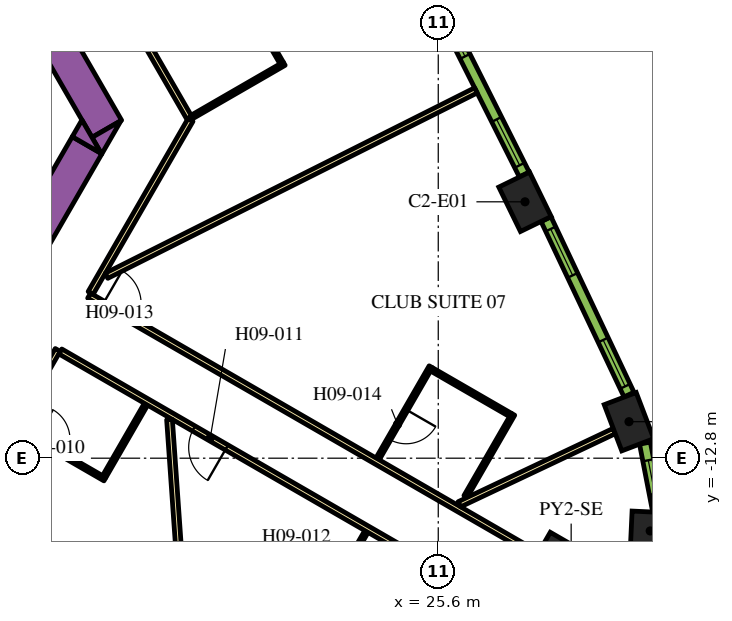
"""IFC4 building model, lengths in metres.
Left out: names, types, materials, properties, quantities, classifications, styles, units other than length and angle.
Written with IfcOpenShell. Run it as: python <this file> out.ifc"""

import sys

from ifc_helpers import new_model, si_unit, direction, frame, frame_2d, origin, origin_2d, place, context, subcontext, project, spatial, polyline, rectangle, outline, extrude, element, fill, save


model = new_model("IFC4")
c1 = context("Model", 3, precision=1e-05, world=origin(), true_north=direction((0.0, 1.0)))
c2 = subcontext(c1, "Body", "Model", "MODEL_VIEW")
j1 = project(units=[si_unit("LENGTHUNIT", "METRE"), si_unit("PLANEANGLEUNIT", "RADIAN")], contexts=[c1])
p1 = place(None, origin())
s1 = spatial("IfcSite", under=j1, at=p1, CompositionType="ELEMENT")
p2 = place(p1, origin())
s2 = spatial("IfcBuilding", under=s1, at=p2, CompositionType="ELEMENT")
p3 = place(p2, frame((0.0, 0.0, 122.7)))
s3 = spatial("IfcBuildingStorey", under=s2, at=p3, CompositionType="ELEMENT", Elevation=122.7)
p4 = place(p3, frame((29.097, -16.799, 0.0), z_axis=(0.0, 0.0, 1.0), x_axis=(0.866025403784, -0.5, 0.0)))
e1 = element("IfcColumn", 1, at=p4, inside=s3, PredefinedType="COLUMN", context=c2, shape_type="SweptSolid", body=[
    extrude(rectangle(XDim=3.0, YDim=3.0, at=origin_2d()), origin(), (0.0, 0.0, 1.0), 3.9),
])
p5 = place(p3, frame((31.177, -14.714, 0.0), z_axis=(0.0, 0.0, 1.0), x_axis=(0.046756026083, 0.998906338965, 0.0)))
e2 = element("IfcColumn", 2, at=p5, inside=s3, PredefinedType="COLUMN", context=c2, shape_type="SweptSolid", body=[
    extrude(rectangle(XDim=1.0, YDim=1.0, at=origin_2d()), origin(), (0.0, 0.0, 1.0), 3.9),
])
for number, where, z_axis, x_axis in (
    (3, (30.619, -11.839, 0.0), (0.0, 0.0, 1.0), (-0.355, 0.935, 0.0)),
    (4, (27.883, -6.054, 0.0), (0.0, 0.0, 1.0), (-0.438, 0.899, 0.0)),
):
    element("IfcColumn", number, at=place(p3, frame(where, z_axis=z_axis, x_axis=x_axis)), inside=s3, PredefinedType="COLUMN", context=c2, shape_type="SweptSolid", body=[
        extrude(rectangle(XDim=1.3, YDim=0.9, at=origin_2d()), origin(), (0.0, 0.0, 1.0), 3.9),
    ])
p6 = place(p3, frame((6.776, 13.364, 0.0), z_axis=(0.0, 0.0, 1.0), x_axis=(0.500004177138, -0.8660229921, 0.0)))
e5 = element("IfcWall", 5, at=p6, inside=s3, PredefinedType="SOLIDWALL", context=c2, shape_type="SweptSolid", body=[
    extrude(rectangle(XDim=20.204, YDim=0.9, at=frame_2d((10.102, 0.0))), origin(), (0.0, 0.0, 1.0), 3.9),
])
p7 = place(p3, origin())
e6 = element("IfcWall", 6, at=p7, inside=s3, PredefinedType="SOLIDWALL", context=c2, shape_type="SweptSolid", body=[
    extrude(outline(polyline([(16.743, -4.8), (16.489, -4.36), (17.251, -3.92), (16.743, -4.8)])), origin(), (0.0, 0.0, 1.0), 3.9),
])
p8 = place(p3, frame((11.943, -12.214, 0.0), z_axis=(0.0, 0.0, 1.0), x_axis=(0.49998092645, 0.866036415623, 0.0)))
e7 = element("IfcWall", 7, at=p8, inside=s3, PredefinedType="SOLIDWALL", context=c2, shape_type="SweptSolid", body=[
    extrude(rectangle(XDim=8.83, YDim=0.9, at=frame_2d((4.415, 0.0))), origin(), (0.0, 0.0, 1.0), 3.9),
])
e8 = element("IfcWall", 8, at=p7, inside=s3, PredefinedType="SOLIDWALL", context=c2, shape_type="SweptSolid", body=[
    extrude(outline(polyline([(16.223, -3.9), (16.732, -4.78), (15.969, -4.34), (16.223, -3.9)])), origin(), (0.0, 0.0, 1.0), 3.9),
])
p9 = place(p3, frame((16.412, -8.523, 0.0), z_axis=(0.0, 0.0, 1.0), x_axis=(0.866025629663, -0.499999608766, 0.0)))
e9 = element("IfcWall", 9, at=p9, inside=s3, PredefinedType="PARTITIONING", context=c2, shape_type="SweptSolid", body=[
    extrude(rectangle(XDim=13.624, YDim=0.15, at=frame_2d((6.812, 0.0))), origin(), (0.0, 0.0, 1.0), 2.75),
])
p10 = place(p9, frame((0.426, 0.0, 0.0)))
e10 = element("IfcOpeningElement", 10, at=p10, cuts=e9, PredefinedType="OPENING", context=c2, shape_type="SweptSolid", body=[
    extrude(rectangle(XDim=1.0, YDim=2.1, at=frame_2d((0.5, 1.05))), frame((0.0, 0.085, 0.0), z_axis=(0.0, -1.0, 0.0), x_axis=(1.0, 0.0, 0.0)), (0.0, 0.0, 1.0), 0.17),
])
p11 = place(p3, frame((19.081, -3.9, 0.0), z_axis=(0.0, 0.0, 1.0), x_axis=(-0.499974327079, -0.866040225545, 0.0)))
e11 = element("IfcWall", 11, at=p11, inside=s3, PredefinedType="PARTITIONING", context=c2, shape_type="SweptSolid", body=[
    extrude(rectangle(XDim=5.258, YDim=0.15, at=frame_2d((2.629, 0.0))), origin(), (0.0, 0.0, 1.0), 2.75),
])
p12 = place(p3, frame((6.163, 18.475, 0.0), z_axis=(0.0, 0.0, 1.0), x_axis=(0.500001317485, -0.866024643133, 0.0)))
e12 = element("IfcWall", 12, at=p12, inside=s3, PredefinedType="PARTITIONING", context=c2, shape_type="SweptSolid", body=[
    extrude(rectangle(XDim=25.767, YDim=0.15, at=frame_2d((12.883, 0.0))), origin(), (0.0, 0.0, 1.0), 2.75),
])
p13 = place(p12, frame((19.306, 0.0, 0.0)))
e13 = element("IfcOpeningElement", 13, at=p13, cuts=e12, PredefinedType="OPENING", context=c2, shape_type="SweptSolid", body=[
    extrude(rectangle(XDim=1.0, YDim=2.1, at=frame_2d((0.5, 1.05))), frame((0.0, 0.085, 0.0), z_axis=(0.0, -1.0, 0.0), x_axis=(1.0, 0.0, 0.0)), (0.0, 0.0, 1.0), 0.17),
])
p14 = place(p12, frame((17.999, 0.0, 0.0)))
e14 = element("IfcOpeningElement", 14, at=p14, cuts=e12, PredefinedType="OPENING", context=c2, shape_type="SweptSolid", body=[
    extrude(rectangle(XDim=1.0, YDim=2.1, at=frame_2d((0.5, 1.05))), frame((0.0, 0.085, 0.0), z_axis=(0.0, -1.0, 0.0), x_axis=(1.0, 0.0, 0.0)), (0.0, 0.0, 1.0), 0.17),
])
p15 = place(p12, frame((0.596, 0.0, 0.0)))
e15 = element("IfcOpeningElement", 15, at=p15, cuts=e12, PredefinedType="OPENING", context=c2, shape_type="SweptSolid", body=[
    extrude(rectangle(XDim=1.0, YDim=2.1, at=frame_2d((0.5, 1.05))), frame((0.0, 0.085, 0.0), z_axis=(0.0, -1.0, 0.0), x_axis=(1.0, 0.0, 0.0)), (0.0, 0.0, 1.0), 0.17),
])
p16 = place(p3, frame((15.587, -9.952, 0.0), z_axis=(0.0, 0.0, 1.0), x_axis=(-0.500016618951, -0.866015808616, 0.0)))
e16 = element("IfcWall", 16, at=p16, inside=s3, PredefinedType="PARTITIONING", context=c2, shape_type="SweptSolid", body=[
    extrude(rectangle(XDim=5.268, YDim=0.15, at=frame_2d((2.634, 0.0))), origin(), (0.0, 0.0, 1.0), 2.75),
])
p17 = place(p16, frame((4.088, 0.0, 0.0)))
e17 = element("IfcOpeningElement", 17, at=p17, cuts=e16, PredefinedType="OPENING", context=c2, shape_type="SweptSolid", body=[
    extrude(rectangle(XDim=1.0, YDim=2.1, at=frame_2d((0.5, 1.05))), frame((0.0, 0.085, 0.0), z_axis=(0.0, -1.0, 0.0), x_axis=(1.0, 0.0, 0.0)), (0.0, 0.0, 1.0), 0.17),
])
p18 = place(p3, frame((27.386, -16.764, 0.0), z_axis=(0.0, 0.0, 1.0), x_axis=(-0.866022585856, 0.500004880763, 0.0)))
e18 = element("IfcWall", 18, at=p18, inside=s3, PredefinedType="PARTITIONING", context=c2, shape_type="SweptSolid", body=[
    extrude(rectangle(XDim=13.544, YDim=0.15, at=frame_2d((6.772, 0.0))), origin(), (0.0, 0.0, 1.0), 2.75),
])
p19 = place(p18, frame((8.491, 0.0, 0.0)))
e19 = element("IfcOpeningElement", 19, at=p19, cuts=e18, PredefinedType="OPENING", context=c2, shape_type="SweptSolid", body=[
    extrude(rectangle(XDim=1.0, YDim=2.1, at=frame_2d((0.5, 1.05))), frame((0.0, 0.085, 0.0), z_axis=(0.0, -1.0, 0.0), x_axis=(1.0, 0.0, 0.0)), (0.0, 0.0, 1.0), 0.17),
])
p20 = place(p3, frame((26.591, -3.122, 0.0), z_axis=(0.0, 0.0, 1.0), x_axis=(-0.893766213273, -0.448533115847, 0.0)))
e20 = element("IfcWall", 20, at=p20, inside=s3, PredefinedType="PARTITIONING", context=c2, shape_type="SweptSolid", body=[
    extrude(rectangle(XDim=10.875, YDim=0.15, at=frame_2d((5.438, 0.0))), origin(), (0.0, 0.0, 1.0), 2.75),
])
p21 = place(p3, frame((19.153, -20.671, 0.0), z_axis=(0.0, 0.0, 1.0), x_axis=(-0.070070736723, 0.997542025107, 0.0)))
e21 = element("IfcWall", 21, at=p21, inside=s3, PredefinedType="PARTITIONING", context=c2, shape_type="SweptSolid", body=[
    extrude(rectangle(XDim=8.909, YDim=0.15, at=frame_2d((4.455, 0.0))), origin(), (0.0, 0.0, 1.0), 2.75),
])
p22 = place(p3, frame((30.231, -12.085, 0.0), z_axis=(0.0, 0.0, 1.0), x_axis=(-0.904001132572, -0.427530060122, 0.0)))
e22 = element("IfcWall", 22, at=p22, inside=s3, PredefinedType="PARTITIONING", context=c2, shape_type="SweptSolid", body=[
    extrude(rectangle(XDim=4.51, YDim=0.15, at=frame_2d((2.255, 0.0))), origin(), (0.0, 0.0, 1.0), 2.75),
])
p23 = place(p3, frame((14.49, -12.003, 0.0), z_axis=(0.0, 0.0, 1.0), x_axis=(0.866059108428, -0.4999416173, 0.0)))
e23 = element("IfcWall", 23, at=p23, inside=s3, PredefinedType="PARTITIONING", context=c2, shape_type="SweptSolid", body=[
    extrude(rectangle(XDim=2.7, YDim=0.1, at=frame_2d((1.35, 0.0))), origin(), (0.0, 0.0, 1.0), 2.75),
])
p24 = place(p23, frame((0.6, 0.0, 0.0)))
e24 = element("IfcOpeningElement", 24, at=p24, cuts=e23, PredefinedType="OPENING", context=c2, shape_type="SweptSolid", body=[
    extrude(rectangle(XDim=0.9, YDim=2.1, at=frame_2d((0.45, 1.05))), frame((0.0, 0.06, 0.0), z_axis=(0.0, -1.0, 0.0), x_axis=(1.0, 0.0, 0.0)), (0.0, 0.0, 1.0), 0.12),
])
p25 = place(p3, frame((16.81, -13.285, 0.0), z_axis=(0.0, 0.0, 1.0), x_axis=(0.499994660107, 0.866028486751, 0.0)))
e25 = element("IfcWall", 25, at=p25, inside=s3, PredefinedType="PARTITIONING", context=c2, shape_type="SweptSolid", body=[
    extrude(rectangle(XDim=2.2, YDim=0.1, at=frame_2d((1.1, 0.0))), origin(), (0.0, 0.0, 1.0), 2.75),
])
p26 = place(p3, frame((23.71, -14.728, 0.0), z_axis=(0.0, 0.0, 1.0), x_axis=(-0.500006934395, -0.866021400173, 0.0)))
e26 = element("IfcWall", 26, at=p26, inside=s3, PredefinedType="PARTITIONING", context=c2, shape_type="SweptSolid", body=[
    extrude(rectangle(XDim=2.6, YDim=0.1, at=frame_2d((1.3, 0.0))), origin(), (0.0, 0.0, 1.0), 2.75),
])
p27 = place(p26, frame((0.6, 0.0, 0.0)))
e27 = element("IfcOpeningElement", 27, at=p27, cuts=e26, PredefinedType="OPENING", context=c2, shape_type="SweptSolid", body=[
    extrude(rectangle(XDim=0.9, YDim=2.1, at=frame_2d((0.45, 1.05))), frame((0.0, 0.06, 0.0), z_axis=(0.0, -1.0, 0.0), x_axis=(1.0, 0.0, 0.0)), (0.0, 0.0, 1.0), 0.12),
])
p28 = place(p3, frame((25.404, -10.395, 0.0), z_axis=(0.0, 0.0, 1.0), x_axis=(-0.49998411664, -0.866034573852, 0.0)))
e28 = element("IfcWall", 28, at=p28, inside=s3, PredefinedType="PARTITIONING", context=c2, shape_type="SweptSolid", body=[
    extrude(rectangle(XDim=2.8, YDim=0.1, at=frame_2d((1.4, 0.0))), origin(), (0.0, 0.0, 1.0), 2.75),
])
p29 = place(p28, frame((1.3, 0.0, 0.0)))
e29 = element("IfcOpeningElement", 29, at=p29, cuts=e28, PredefinedType="OPENING", context=c2, shape_type="SweptSolid", body=[
    extrude(rectangle(XDim=0.9, YDim=2.1, at=frame_2d((0.45, 1.05))), frame((0.0, 0.06, 0.0), z_axis=(0.0, -1.0, 0.0), x_axis=(1.0, 0.0, 0.0)), (0.0, 0.0, 1.0), 0.12),
])
p30 = place(p3, frame((25.422, -10.463, 0.0), z_axis=(0.0, 0.0, 1.0), x_axis=(0.866024647952, -0.500001309137, 0.0)))
e30 = element("IfcWall", 30, at=p30, inside=s3, PredefinedType="PARTITIONING", context=c2, shape_type="SweptSolid", body=[
    extrude(rectangle(XDim=2.4, YDim=0.1, at=frame_2d((1.2, 0.0))), origin(), (0.0, 0.0, 1.0), 2.75),
])
p31 = place(p3, frame((26.319, -13.81, 0.0), z_axis=(0.0, 0.0, 1.0), x_axis=(0.500004234368, 0.866022959057, 0.0)))
e31 = element("IfcWall", 31, at=p31, inside=s3, PredefinedType="PARTITIONING", context=c2, shape_type="SweptSolid", body=[
    extrude(rectangle(XDim=2.5, YDim=0.1, at=frame_2d((1.25, 0.0))), origin(), (0.0, 0.0, 1.0), 2.75),
])
p32 = place(p3, frame((20.278, -0.323, 0.0), z_axis=(0.0, 0.0, 1.0), x_axis=(0.500001309137, -0.866024647952, 0.0)))
e32 = element("IfcWall", 32, at=p32, inside=s3, PredefinedType="PARTITIONING", context=c2, shape_type="SweptSolid", body=[
    extrude(rectangle(XDim=2.4, YDim=0.1, at=frame_2d((1.2, 0.0))), origin(), (0.0, 0.0, 1.0), 2.75),
])
p33 = place(p3, frame((19.121, -3.819, 0.0), z_axis=(0.0, 0.0, 1.0), x_axis=(0.866034573852, 0.49998411664, 0.0)))
e33 = element("IfcWall", 33, at=p33, inside=s3, PredefinedType="PARTITIONING", context=c2, shape_type="SweptSolid", body=[
    extrude(rectangle(XDim=2.8, YDim=0.1, at=frame_2d((1.4, 0.0))), origin(), (0.0, 0.0, 1.0), 2.75),
])
p34 = place(p3, frame((31.385, -14.189, 0.0), z_axis=(0.0, 0.0, 1.0), x_axis=(-0.190409913989, 0.981704672829, 0.0)))
e34 = element("IfcWall", 34, at=p34, inside=s3, PredefinedType="SOLIDWALL", context=c2, shape_type="SweptSolid", body=[
    extrude(rectangle(XDim=1.819, YDim=0.29, at=frame_2d((0.91, 0.0))), origin(), (0.0, 0.0, 1.0), 3.65),
])
p35 = place(p34, frame((0.46, 0.0, 0.9)))
e35 = element("IfcOpeningElement", 35, at=p35, cuts=e34, PredefinedType="OPENING", context=c2, shape_type="SweptSolid", body=[
    extrude(rectangle(XDim=0.9, YDim=2.15, at=frame_2d((0.45, 1.075))), frame((0.0, 0.155, 0.0), z_axis=(0.0, -1.0, 0.0), x_axis=(1.0, 0.0, 0.0)), (0.0, 0.0, 1.0), 0.31),
])
p36 = place(p3, frame((30.62, -11.127, 0.0), z_axis=(0.0, 0.0, 1.0), x_axis=(-0.427543726596, 0.903994669148, 0.0)))
e36 = element("IfcWall", 36, at=p36, inside=s3, PredefinedType="SOLIDWALL", context=c2, shape_type="SweptSolid", body=[
    extrude(rectangle(XDim=5.107, YDim=0.29, at=frame_2d((2.553, 0.0))), origin(), (0.0, 0.0, 1.0), 3.65),
])
p37 = place(p36, frame((0.24, 0.0, 0.9)))
e37 = element("IfcOpeningElement", 37, at=p37, cuts=e36, PredefinedType="OPENING", context=c2, shape_type="SweptSolid", body=[
    extrude(rectangle(XDim=1.35, YDim=2.15, at=frame_2d((0.675, 1.075))), frame((0.0, 0.155, 0.0), z_axis=(0.0, -1.0, 0.0), x_axis=(1.0, 0.0, 0.0)), (0.0, 0.0, 1.0), 0.31),
])
p38 = place(p36, frame((3.471, 0.0, 0.9)))
e38 = element("IfcOpeningElement", 38, at=p38, cuts=e36, PredefinedType="OPENING", context=c2, shape_type="SweptSolid", body=[
    extrude(rectangle(XDim=1.35, YDim=2.15, at=frame_2d((0.675, 1.075))), frame((0.0, 0.155, 0.0), z_axis=(0.0, -1.0, 0.0), x_axis=(1.0, 0.0, 0.0)), (0.0, 0.0, 1.0), 0.31),
])
p39 = place(p3, frame((27.864, -5.336, 0.0), z_axis=(0.0, 0.0, 1.0), x_axis=(-0.448534297211, 0.893765620409, 0.0)))
e39 = element("IfcWall", 39, at=p39, inside=s3, PredefinedType="SOLIDWALL", context=c2, shape_type="SweptSolid", body=[
    extrude(rectangle(XDim=5.1, YDim=0.29, at=frame_2d((2.55, 0.0))), origin(), (0.0, 0.0, 1.0), 3.65),
])
p40 = place(p39, frame((0.272, 0.0, 0.9)))
e40 = element("IfcOpeningElement", 40, at=p40, cuts=e39, PredefinedType="OPENING", context=c2, shape_type="SweptSolid", body=[
    extrude(rectangle(XDim=1.35, YDim=2.15, at=frame_2d((0.675, 1.075))), frame((0.0, 0.155, 0.0), z_axis=(0.0, -1.0, 0.0), x_axis=(1.0, 0.0, 0.0)), (0.0, 0.0, 1.0), 0.31),
])
p41 = place(p39, frame((3.478, 0.0, 0.9)))
e41 = element("IfcOpeningElement", 41, at=p41, cuts=e39, PredefinedType="OPENING", context=c2, shape_type="SweptSolid", body=[
    extrude(rectangle(XDim=1.35, YDim=2.15, at=frame_2d((0.675, 1.075))), frame((0.0, 0.155, 0.0), z_axis=(0.0, -1.0, 0.0), x_axis=(1.0, 0.0, 0.0)), (0.0, 0.0, 1.0), 0.31),
])
p42 = place(p24, origin())
e42 = element("IfcDoor", 42, at=p42, inside=s3, OperationType="SINGLE_SWING_LEFT", PredefinedType="DOOR", context=c2, shape_type="SweptSolid", body=[
    extrude(rectangle(XDim=0.9, YDim=2.1, at=frame_2d((0.45, 1.05))), frame((0.0, 0.025, 0.0), z_axis=(0.0, -1.0, 0.0), x_axis=(1.0, 0.0, 0.0)), (0.0, 0.0, 1.0), 0.05),
])
fill(e24, e42)
p43 = place(p19, origin())
e43 = element("IfcDoor", 43, at=p43, inside=s3, OperationType="SINGLE_SWING_RIGHT", PredefinedType="DOOR", context=c2, shape_type="SweptSolid", body=[
    extrude(rectangle(XDim=1.0, YDim=2.1, at=frame_2d((0.5, 1.05))), frame((0.0, 0.025, 0.0), z_axis=(0.0, -1.0, 0.0), x_axis=(1.0, 0.0, 0.0)), (0.0, 0.0, 1.0), 0.05),
])
fill(e19, e43)
p44 = place(p10, origin())
e44 = element("IfcDoor", 44, at=p44, inside=s3, OperationType="SINGLE_SWING_LEFT", PredefinedType="DOOR", context=c2, shape_type="SweptSolid", body=[
    extrude(rectangle(XDim=1.0, YDim=2.1, at=frame_2d((0.5, 1.05))), frame((0.0, 0.025, 0.0), z_axis=(0.0, -1.0, 0.0), x_axis=(1.0, 0.0, 0.0)), (0.0, 0.0, 1.0), 0.05),
])
fill(e10, e44)
p45 = place(p29, origin())
e45 = element("IfcDoor", 45, at=p45, inside=s3, OperationType="SINGLE_SWING_LEFT", PredefinedType="DOOR", context=c2, shape_type="SweptSolid", body=[
    extrude(rectangle(XDim=0.9, YDim=2.1, at=frame_2d((0.45, 1.05))), frame((0.0, 0.025, 0.0), z_axis=(0.0, -1.0, 0.0), x_axis=(1.0, 0.0, 0.0)), (0.0, 0.0, 1.0), 0.05),
])
fill(e29, e45)
p46 = place(p35, origin())
e46 = element("IfcWindow", 46, at=p46, inside=s3, PartitioningType="SINGLE_PANEL", PredefinedType="WINDOW", context=c2, shape_type="SweptSolid", body=[
    extrude(rectangle(XDim=0.9, YDim=2.15, at=frame_2d((0.45, 1.075))), frame((0.0, 0.015, 0.0), z_axis=(0.0, -1.0, 0.0), x_axis=(1.0, 0.0, 0.0)), (0.0, 0.0, 1.0), 0.06),
])
fill(e35, e46)
p47 = place(p37, origin())
e47 = element("IfcWindow", 47, at=p47, inside=s3, PartitioningType="DOUBLE_PANEL_VERTICAL", PredefinedType="WINDOW", context=c2, shape_type="SweptSolid", body=[
    extrude(rectangle(XDim=1.35, YDim=2.15, at=frame_2d((0.675, 1.075))), frame((0.0, 0.015, 0.0), z_axis=(0.0, -1.0, 0.0), x_axis=(1.0, 0.0, 0.0)), (0.0, 0.0, 1.0), 0.06),
])
fill(e37, e47)
p48 = place(p38, origin())
e48 = element("IfcWindow", 48, at=p48, inside=s3, PartitioningType="DOUBLE_PANEL_VERTICAL", PredefinedType="WINDOW", context=c2, shape_type="SweptSolid", body=[
    extrude(rectangle(XDim=1.35, YDim=2.15, at=frame_2d((0.675, 1.075))), frame((0.0, 0.015, 0.0), z_axis=(0.0, -1.0, 0.0), x_axis=(1.0, 0.0, 0.0)), (0.0, 0.0, 1.0), 0.06),
])
fill(e38, e48)
p49 = place(p40, origin())
e49 = element("IfcWindow", 49, at=p49, inside=s3, PartitioningType="DOUBLE_PANEL_VERTICAL", PredefinedType="WINDOW", context=c2, shape_type="SweptSolid", body=[
    extrude(rectangle(XDim=1.35, YDim=2.15, at=frame_2d((0.675, 1.075))), frame((0.0, 0.015, 0.0), z_axis=(0.0, -1.0, 0.0), x_axis=(1.0, 0.0, 0.0)), (0.0, 0.0, 1.0), 0.06),
])
fill(e40, e49)
p50 = place(p41, origin())
e50 = element("IfcWindow", 50, at=p50, inside=s3, PartitioningType="DOUBLE_PANEL_VERTICAL", PredefinedType="WINDOW", context=c2, shape_type="SweptSolid", body=[
    extrude(rectangle(XDim=1.35, YDim=2.15, at=frame_2d((0.675, 1.075))), frame((0.0, 0.015, 0.0), z_axis=(0.0, -1.0, 0.0), x_axis=(1.0, 0.0, 0.0)), (0.0, 0.0, 1.0), 0.06),
])
fill(e41, e50)
save(model, sys.argv[1])
